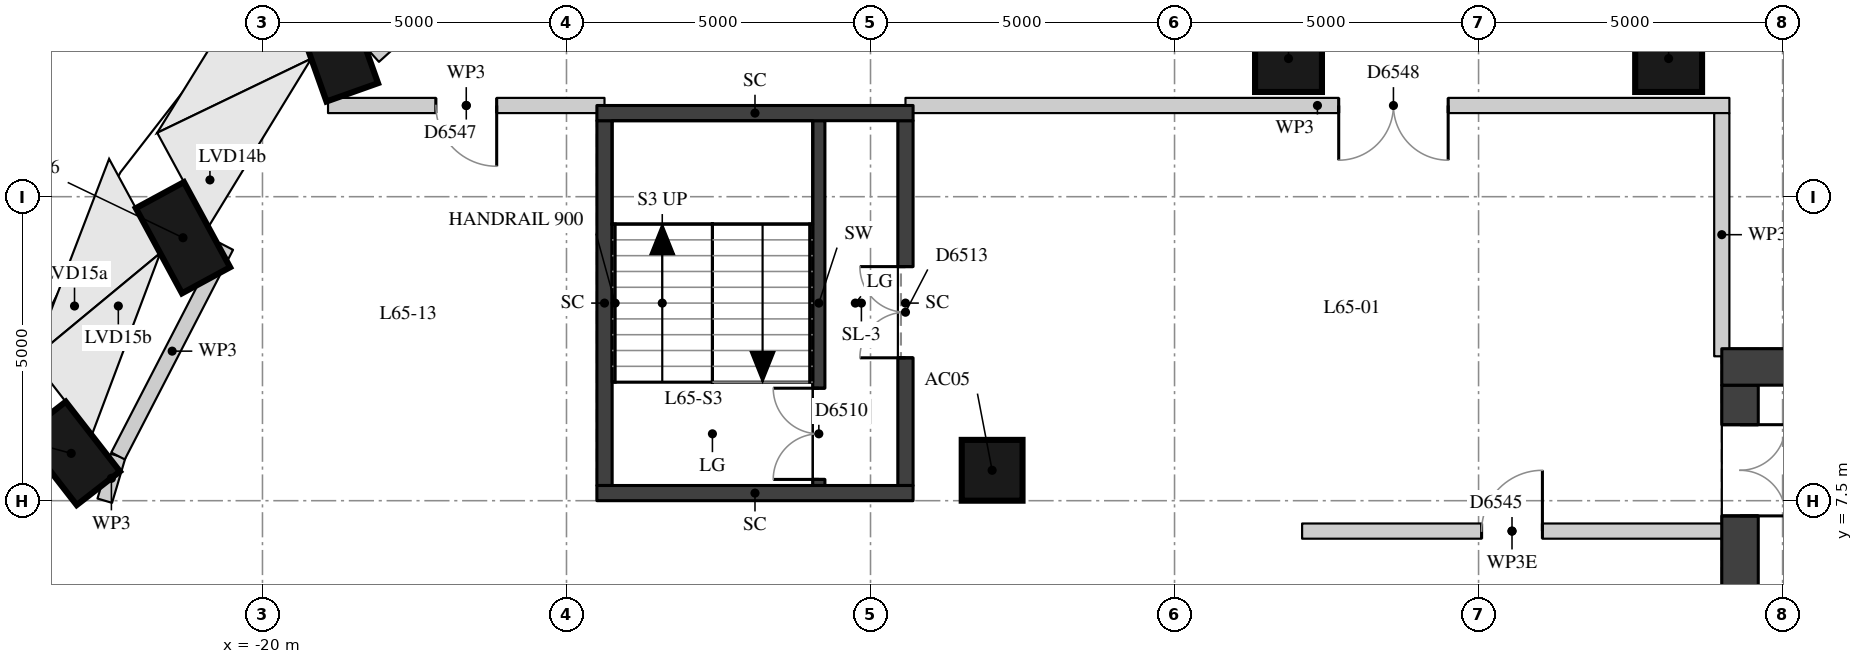
"""IFC4 building model, lengths in metres.
Left out: names, types, materials, properties, quantities, classifications, styles, units other than length and angle.
Written with IfcOpenShell. Run it as: python <this file> out.ifc"""

import sys

from ifc_helpers import new_model, si_unit, direction, frame, frame_2d, origin, origin_2d, place, context, subcontext, project, spatial, rectangle, extrude, element, fill, save


model = new_model("IFC4")
c1 = context("Model", 3, precision=1e-05, world=origin(), true_north=direction((0.0, 1.0)))
c2 = subcontext(c1, "Body", "Model", "MODEL_VIEW")
j1 = project(units=[si_unit("LENGTHUNIT", "METRE"), si_unit("PLANEANGLEUNIT", "RADIAN")], contexts=[c1])
p1 = place(None, origin())
s1 = spatial("IfcSite", under=j1, at=p1, CompositionType="ELEMENT")
p2 = place(p1, origin())
s2 = spatial("IfcBuilding", under=s1, at=p2, CompositionType="ELEMENT")
p3 = place(p2, frame((0.0, 0.0, 228.8)))
s3 = spatial("IfcBuildingStorey", under=s2, at=p3, CompositionType="ELEMENT", Elevation=228.8)
p4 = place(p3, frame((-19.102, 15.845, 0.304), z_axis=(0.135957023528, -0.382468724981, 0.9139110253), x_axis=(-0.306105353359, 0.861123031169, 0.405914569627)))
e1 = element("IfcColumn", 1, at=p4, inside=s3, PredefinedType="COLUMN", context=c2, shape_type="SweptSolid", body=[
    extrude(rectangle(XDim=1.5, YDim=0.9, at=origin_2d()), origin(), (0.0, 0.0, 1.0), 4.258),
])
p5 = place(p3, frame((-21.687, 12.525, 0.281), z_axis=(0.178652909801, -0.329599673358, 0.927063748154), x_axis=(-0.441773775165, 0.815035658557, 0.37490373012)))
e2 = element("IfcColumn", 2, at=p5, inside=s3, PredefinedType="COLUMN", context=c2, shape_type="SweptSolid", body=[
    extrude(rectangle(XDim=1.5, YDim=0.9, at=origin_2d()), origin(), (0.0, 0.0, 1.0), 4.247),
])
p6 = place(p3, frame((-23.591, 8.852, 0.257), z_axis=(0.210086577145, -0.270390804164, 0.939549063715), x_axis=(-0.576455607912, 0.741924103418, 0.342414305883)))
e3 = element("IfcColumn", 3, at=p6, inside=s3, PredefinedType="COLUMN", context=c2, shape_type="SweptSolid", body=[
    extrude(rectangle(XDim=1.5, YDim=0.9, at=origin_2d()), origin(), (0.0, 0.0, 1.0), 4.243),
])
p7 = place(p3, frame((-8.0, 8.0, 0.0), z_axis=(0.0, 0.0, 1.0), x_axis=(1.0, 0.0, 0.0)))
e4 = element("IfcColumn", 4, at=p7, inside=s3, PredefinedType="COLUMN", context=c2, shape_type="SweptSolid", body=[
    extrude(rectangle(XDim=1.0, YDim=1.0, at=origin_2d()), origin(), (0.0, 0.0, 1.0), 4.5),
])
for number, where, z_axis, x_axis in (
    (5, (3.126, 14.772, 0.0), (0.0, 0.0, 1.0), (1.0, 0.0, 0.0)),
    (6, (-3.126, 14.772, 0.0), (0.0, 0.0, 1.0), (1.0, 0.0, 0.0)),
):
    element("IfcColumn", number, at=place(p3, frame(where, z_axis=z_axis, x_axis=x_axis)), inside=s3, PredefinedType="COLUMN", context=c2, shape_type="SweptSolid", body=[
        extrude(rectangle(XDim=1.1, YDim=1.1, at=origin_2d()), origin(), (0.0, 0.0, 1.0), 4.5),
    ])
p8 = place(p3, frame((4.3, -9.4, 0.0), z_axis=(0.0, 0.0, 1.0), x_axis=(0.0, 1.0, 0.0)))
e7 = element("IfcWall", 7, at=p8, inside=s3, PredefinedType="SHEAR", context=c2, shape_type="SweptSolid", body=[
    extrude(rectangle(XDim=18.8, YDim=0.6, at=frame_2d((9.4, 0.0))), origin(), (0.0, 0.0, 1.0), 4.22),
])
p9 = place(p8, frame((0.65, 0.0, 0.0)))
e8 = element("IfcOpeningElement", 8, at=p9, cuts=e7, PredefinedType="OPENING", context=c2, shape_type="SweptSolid", body=[
    extrude(rectangle(XDim=1.5, YDim=2.1, at=frame_2d((0.75, 1.05))), frame((0.0, 0.31, 0.0), z_axis=(0.0, -1.0, 0.0), x_axis=(1.0, 0.0, 0.0)), (0.0, 0.0, 1.0), 0.62),
])
p10 = place(p8, frame((3.75, 0.0, 0.0)))
e9 = element("IfcOpeningElement", 9, at=p10, cuts=e7, PredefinedType="OPENING", context=c2, shape_type="SweptSolid", body=[
    extrude(rectangle(XDim=1.8, YDim=2.1, at=frame_2d((0.9, 1.05))), frame((0.0, 0.31, 0.0), z_axis=(0.0, -1.0, 0.0), x_axis=(1.0, 0.0, 0.0)), (0.0, 0.0, 1.0), 0.62),
])
p11 = place(p8, frame((6.25, 0.0, 0.0)))
e10 = element("IfcOpeningElement", 10, at=p11, cuts=e7, PredefinedType="OPENING", context=c2, shape_type="SweptSolid", body=[
    extrude(rectangle(XDim=1.1, YDim=2.1, at=frame_2d((0.55, 1.05))), frame((0.0, 0.31, 0.0), z_axis=(0.0, -1.0, 0.0), x_axis=(1.0, 0.0, 0.0)), (0.0, 0.0, 1.0), 0.62),
])
p12 = place(p8, frame((8.9, 0.0, 0.0)))
e11 = element("IfcOpeningElement", 11, at=p12, cuts=e7, PredefinedType="OPENING", context=c2, shape_type="SweptSolid", body=[
    extrude(rectangle(XDim=1.0, YDim=2.1, at=frame_2d((0.5, 1.05))), frame((0.0, 0.31, 0.0), z_axis=(0.0, -1.0, 0.0), x_axis=(1.0, 0.0, 0.0)), (0.0, 0.0, 1.0), 0.62),
])
p13 = place(p8, frame((11.45, 0.0, 0.0)))
e12 = element("IfcOpeningElement", 12, at=p13, cuts=e7, PredefinedType="OPENING", context=c2, shape_type="SweptSolid", body=[
    extrude(rectangle(XDim=1.1, YDim=2.1, at=frame_2d((0.55, 1.05))), frame((0.0, 0.31, 0.0), z_axis=(0.0, -1.0, 0.0), x_axis=(1.0, 0.0, 0.0)), (0.0, 0.0, 1.0), 0.62),
])
p14 = place(p8, frame((13.25, 0.0, 0.0)))
e13 = element("IfcOpeningElement", 13, at=p14, cuts=e7, PredefinedType="OPENING", context=c2, shape_type="SweptSolid", body=[
    extrude(rectangle(XDim=1.8, YDim=2.1, at=frame_2d((0.9, 1.05))), frame((0.0, 0.31, 0.0), z_axis=(0.0, -1.0, 0.0), x_axis=(1.0, 0.0, 0.0)), (0.0, 0.0, 1.0), 0.62),
])
p15 = place(p8, frame((16.65, 0.0, 0.0)))
e14 = element("IfcOpeningElement", 14, at=p15, cuts=e7, PredefinedType="OPENING", context=c2, shape_type="SweptSolid", body=[
    extrude(rectangle(XDim=1.5, YDim=2.1, at=frame_2d((0.75, 1.05))), frame((0.0, 0.31, 0.0), z_axis=(0.0, -1.0, 0.0), x_axis=(1.0, 0.0, 0.0)), (0.0, 0.0, 1.0), 0.62),
])
p16 = place(p3, frame((4.0, 9.7, 0.0), z_axis=(0.0, 0.0, 1.0), x_axis=(1.0, 0.0, 0.0)))
e15 = element("IfcWall", 15, at=p16, inside=s3, PredefinedType="SHEAR", context=c2, shape_type="SweptSolid", body=[
    extrude(rectangle(XDim=12.0, YDim=0.6, at=frame_2d((6.0, 0.0))), origin(), (0.0, 0.0, 1.0), 4.22),
])
p17 = place(p3, frame((-10.85, 7.75, 0.0), z_axis=(0.0, 0.0, 1.0), x_axis=(0.0, 1.0, 0.0)))
e16 = element("IfcWall", 16, at=p17, inside=s3, PredefinedType="SHEAR", context=c2, shape_type="SweptSolid", body=[
    extrude(rectangle(XDim=6.0, YDim=0.2, at=frame_2d((3.0, 0.0))), origin(), (0.0, 0.0, 1.0), 4.22),
])
p18 = place(p17, frame((0.1, 0.0, 0.0)))
e17 = element("IfcOpeningElement", 17, at=p18, cuts=e16, PredefinedType="OPENING", context=c2, shape_type="SweptSolid", body=[
    extrude(rectangle(XDim=1.5, YDim=2.1, at=frame_2d((0.75, 1.05))), frame((0.0, 0.11, 0.0), z_axis=(0.0, -1.0, 0.0), x_axis=(1.0, 0.0, 0.0)), (0.0, 0.0, 1.0), 0.22),
])
p19 = place(p3, frame((-14.375, 7.75, -0.45), z_axis=(0.0, 0.0, 1.0), x_axis=(0.0, 1.0, 0.0)))
e18 = element("IfcWall", 18, at=p19, inside=s3, PredefinedType="SHEAR", context=c2, shape_type="SweptSolid", body=[
    extrude(rectangle(XDim=6.0, YDim=0.25, at=frame_2d((3.0, 0.0))), origin(), (0.0, 0.0, 1.0), 4.67),
])
p20 = place(p3, frame((-9.425, 7.75, -0.45), z_axis=(0.0, 0.0, 1.0), x_axis=(0.0, 1.0, 0.0)))
e19 = element("IfcWall", 19, at=p20, inside=s3, PredefinedType="SHEAR", context=c2, shape_type="SweptSolid", body=[
    extrude(rectangle(XDim=6.0, YDim=0.25, at=frame_2d((3.0, 0.0))), origin(), (0.0, 0.0, 1.0), 4.67),
])
p21 = place(p20, frame((2.1, 0.0, 0.45)))
e20 = element("IfcOpeningElement", 20, at=p21, cuts=e19, PredefinedType="OPENING", context=c2, shape_type="SweptSolid", body=[
    extrude(rectangle(XDim=1.5, YDim=2.1, at=frame_2d((0.75, 1.05))), frame((0.0, 0.135, 0.0), z_axis=(0.0, -1.0, 0.0), x_axis=(1.0, 0.0, 0.0)), (0.0, 0.0, 1.0), 0.27),
])
for number, where, z_axis, x_axis in (
    (21, (-14.5, 13.875, -0.45), (0.0, 0.0, 1.0), (1.0, 0.0, 0.0)),
    (22, (-14.5, 7.625, -0.45), (0.0, 0.0, 1.0), (1.0, 0.0, 0.0)),
):
    element("IfcWall", number, at=place(p3, frame(where, z_axis=z_axis, x_axis=x_axis)), inside=s3, PredefinedType="SHEAR", context=c2, shape_type="SweptSolid", body=[
        extrude(rectangle(XDim=5.2, YDim=0.25, at=frame_2d((2.6, 0.0))), origin(), (0.0, 0.0, 1.0), 4.67),
    ])
p22 = place(p3, frame((-15.827, 16.922, 0.0), z_axis=(0.0, 0.0, 1.0), x_axis=(-0.742562172492, -0.669777142029, 0.0)))
e23 = element("IfcWall", 23, at=p22, inside=s3, PredefinedType="PARTITIONING", context=c2, shape_type="SweptSolid", body=[
    extrude(rectangle(XDim=3.153, YDim=0.25, at=frame_2d((1.577, 0.0))), origin(), (0.0, 0.0, 1.0), 4.22),
])
p23 = place(p3, frame((-22.375, 8.236, 0.0), z_axis=(0.0, 0.0, 1.0), x_axis=(-0.284077498489, -0.958801321887, 0.0)))
e24 = element("IfcWall", 24, at=p23, inside=s3, PredefinedType="PARTITIONING", context=c2, shape_type="SweptSolid", body=[
    extrude(rectangle(XDim=0.768, YDim=0.25, at=frame_2d((0.384, 0.0))), origin(), (0.0, 0.0, 1.0), 4.22),
])
p24 = place(p3, frame((-20.595, 11.683, 0.0), z_axis=(0.0, 0.0, 1.0), x_axis=(-0.458928175317, -0.888473370394, 0.0)))
e25 = element("IfcWall", 25, at=p24, inside=s3, PredefinedType="PARTITIONING", context=c2, shape_type="SweptSolid", body=[
    extrude(rectangle(XDim=3.88, YDim=0.25, at=frame_2d((1.94, 0.0))), origin(), (0.0, 0.0, 1.0), 4.22),
])
p25 = place(p3, frame((-2.902, 7.0, 0.0), z_axis=(0.0, 0.0, 1.0), x_axis=(1.0, 0.0, 0.0)))
e26 = element("IfcWall", 26, at=p25, inside=s3, PredefinedType="PARTITIONING", context=c2, shape_type="SweptSolid", body=[
    extrude(rectangle(XDim=6.904, YDim=0.25, at=frame_2d((3.452, 0.0))), origin(), (0.0, 0.0, 1.0), 3.67),
])
p26 = place(p25, frame((2.952, 0.0, 0.0)))
e27 = element("IfcOpeningElement", 27, at=p26, cuts=e26, PredefinedType="OPENING", context=c2, shape_type="SweptSolid", body=[
    extrude(rectangle(XDim=1.0, YDim=2.1, at=frame_2d((0.5, 1.05))), frame((0.0, 0.135, 0.0), z_axis=(0.0, -1.0, 0.0), x_axis=(1.0, 0.0, 0.0)), (0.0, 0.0, 1.0), 0.27),
])
p27 = place(p3, frame((-18.922, 14.0, 0.0), z_axis=(0.0, 0.0, 1.0), x_axis=(1.0, 0.0, 0.0)))
e28 = element("IfcWall", 28, at=p27, inside=s3, PredefinedType="PARTITIONING", context=c2, shape_type="SweptSolid", body=[
    extrude(rectangle(XDim=4.547, YDim=0.25, at=frame_2d((2.273, 0.0))), origin(), (0.0, 0.0, 1.0), 4.22),
])
p28 = place(p27, frame((1.774, 0.0, 0.0)))
e29 = element("IfcOpeningElement", 29, at=p28, cuts=e28, PredefinedType="OPENING", context=c2, shape_type="SweptSolid", body=[
    extrude(rectangle(XDim=1.0, YDim=2.1, at=frame_2d((0.5, 1.05))), frame((0.0, 0.135, 0.0), z_axis=(0.0, -1.0, 0.0), x_axis=(1.0, 0.0, 0.0)), (0.0, 0.0, 1.0), 0.27),
])
p29 = place(p3, frame((-9.425, 14.0, 0.0), z_axis=(0.0, 0.0, 1.0), x_axis=(1.0, 0.0, 0.0)))
e30 = element("IfcWall", 30, at=p29, inside=s3, PredefinedType="PARTITIONING", context=c2, shape_type="SweptSolid", body=[
    extrude(rectangle(XDim=13.55, YDim=0.25, at=frame_2d((6.775, 0.0))), origin(), (0.0, 0.0, 1.0), 4.22),
])
p30 = place(p29, frame((7.125, 0.0, 0.0)))
e31 = element("IfcOpeningElement", 31, at=p30, cuts=e30, PredefinedType="OPENING", context=c2, shape_type="SweptSolid", body=[
    extrude(rectangle(XDim=1.8, YDim=2.1, at=frame_2d((0.9, 1.05))), frame((0.0, 0.135, 0.0), z_axis=(0.0, -1.0, 0.0), x_axis=(1.0, 0.0, 0.0)), (0.0, 0.0, 1.0), 0.27),
])
p31 = place(p3, frame((4.0, 9.875, 0.0), z_axis=(0.0, 0.0, 1.0), x_axis=(0.0, 1.0, 0.0)))
e32 = element("IfcWall", 32, at=p31, inside=s3, PredefinedType="PARTITIONING", context=c2, shape_type="SweptSolid", body=[
    extrude(rectangle(XDim=4.0, YDim=0.25, at=frame_2d((2.0, 0.0))), origin(), (0.0, 0.0, 1.0), 4.22),
])
p32 = place(p15, origin())
e33 = element("IfcDoor", 33, at=p32, inside=s3, OperationType="DOUBLE_DOOR_SINGLE_SWING", PredefinedType="DOOR", context=c2, shape_type="SweptSolid", body=[
    extrude(rectangle(XDim=1.5, YDim=2.1, at=frame_2d((0.75, 1.05))), frame((0.0, 0.025, 0.0), z_axis=(0.0, -1.0, 0.0), x_axis=(1.0, 0.0, 0.0)), (0.0, 0.0, 1.0), 0.05),
])
fill(e14, e33)
p33 = place(p18, origin())
e34 = element("IfcDoor", 34, at=p33, inside=s3, OperationType="DOUBLE_DOOR_SINGLE_SWING", PredefinedType="DOOR", context=c2, shape_type="SweptSolid", body=[
    extrude(rectangle(XDim=1.5, YDim=2.1, at=frame_2d((0.75, 1.05))), frame((0.0, 0.025, 0.0), z_axis=(0.0, -1.0, 0.0), x_axis=(1.0, 0.0, 0.0)), (0.0, 0.0, 1.0), 0.05),
])
fill(e17, e34)
p34 = place(p21, origin())
e35 = element("IfcDoor", 35, at=p34, inside=s3, OperationType="DOUBLE_DOOR_SINGLE_SWING", PredefinedType="DOOR", context=c2, shape_type="SweptSolid", body=[
    extrude(rectangle(XDim=1.5, YDim=2.1, at=frame_2d((0.75, 1.05))), frame((0.0, 0.025, 0.0), z_axis=(0.0, -1.0, 0.0), x_axis=(1.0, 0.0, 0.0)), (0.0, 0.0, 1.0), 0.05),
])
fill(e20, e35)
p35 = place(p30, origin())
e36 = element("IfcDoor", 36, at=p35, inside=s3, OperationType="DOUBLE_DOOR_SINGLE_SWING", PredefinedType="DOOR", context=c2, shape_type="SweptSolid", body=[
    extrude(rectangle(XDim=1.8, YDim=2.1, at=frame_2d((0.9, 1.05))), frame((0.0, 0.025, 0.0), z_axis=(0.0, -1.0, 0.0), x_axis=(1.0, 0.0, 0.0)), (0.0, 0.0, 1.0), 0.05),
])
fill(e31, e36)
p36 = place(p28, origin())
e37 = element("IfcDoor", 37, at=p36, inside=s3, OperationType="SINGLE_SWING_LEFT", PredefinedType="DOOR", context=c2, shape_type="SweptSolid", body=[
    extrude(rectangle(XDim=1.0, YDim=2.1, at=frame_2d((0.5, 1.05))), frame((0.0, 0.025, 0.0), z_axis=(0.0, -1.0, 0.0), x_axis=(1.0, 0.0, 0.0)), (0.0, 0.0, 1.0), 0.05),
])
fill(e29, e37)
p37 = place(p26, origin())
e38 = element("IfcDoor", 38, at=p37, inside=s3, OperationType="SINGLE_SWING_RIGHT", PredefinedType="DOOR", context=c2, shape_type="SweptSolid", body=[
    extrude(rectangle(XDim=1.0, YDim=2.1, at=frame_2d((0.5, 1.05))), frame((0.0, 0.025, 0.0), z_axis=(0.0, -1.0, 0.0), x_axis=(1.0, 0.0, 0.0)), (0.0, 0.0, 1.0), 0.05),
])
fill(e27, e38)
save(model, sys.argv[1])
